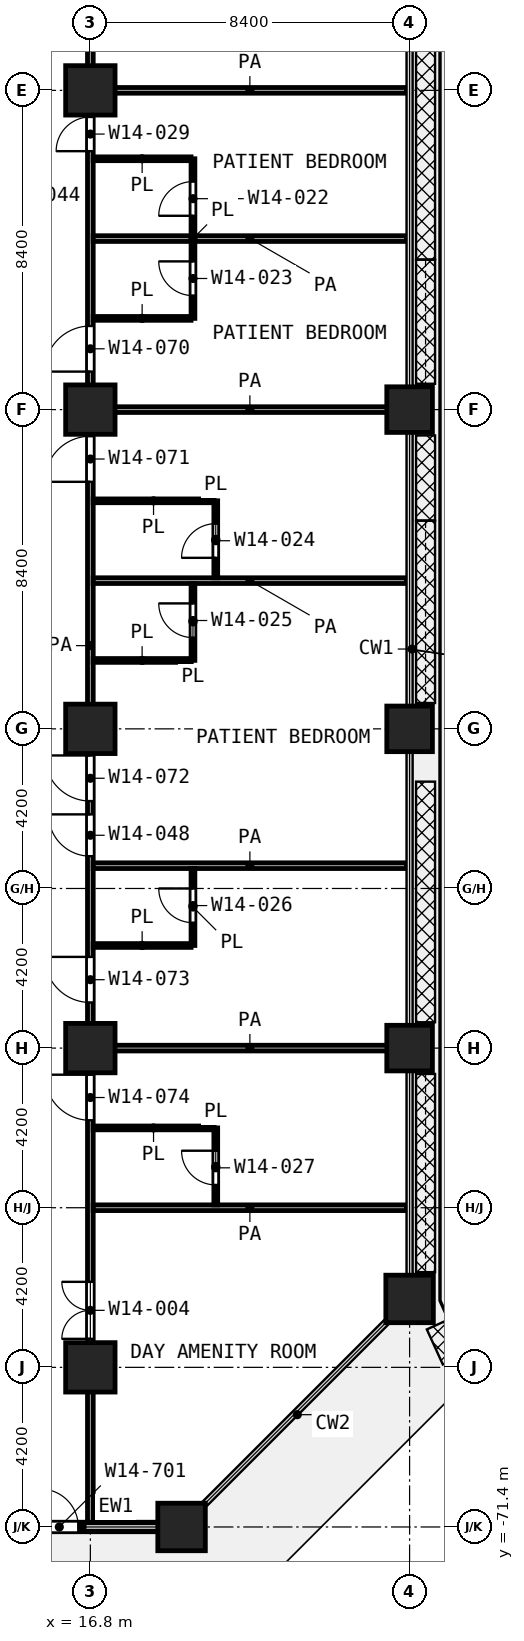
"""IFC4 building model, lengths in metres.
Left out: names, types, materials, properties, quantities, classifications, styles, units other than length and angle.
Written with IfcOpenShell. Run it as: python <this file> out.ifc"""

import sys

from ifc_helpers import new_model, si_unit, direction, frame, frame_2d, origin, origin_2d, place, context, subcontext, project, spatial, rectangle, extrude, element, fill, save


model = new_model("IFC4")
c1 = context("Model", 3, precision=1e-05, world=origin(), true_north=direction((0.0, 1.0)))
c2 = subcontext(c1, "Body", "Model", "MODEL_VIEW")
j1 = project(units=[si_unit("LENGTHUNIT", "METRE"), si_unit("PLANEANGLEUNIT", "RADIAN")], contexts=[c1])
p1 = place(None, origin())
s1 = spatial("IfcSite", under=j1, at=p1, CompositionType="ELEMENT")
p2 = place(p1, origin())
s2 = spatial("IfcBuilding", under=s1, at=p2, CompositionType="ELEMENT")
p3 = place(p2, frame((0.0, 0.0, 64.4)))
s3 = spatial("IfcBuildingStorey", under=s2, at=p3, CompositionType="ELEMENT", Elevation=64.4)
for number, where, z_axis, x_axis in (
    (1, (16.8, -33.6, 0.0), (0.0, 0.0, 1.0), (1.0, 0.0, 0.0)),
    (2, (16.8, -42.0, 0.0), (0.0, 0.0, 1.0), (1.0, 0.0, 0.0)),
):
    element("IfcColumn", number, at=place(p3, frame(where, z_axis=z_axis, x_axis=x_axis)), inside=s3, PredefinedType="COLUMN", context=c2, shape_type="SweptSolid", body=[
        extrude(rectangle(XDim=1.3, YDim=1.3, at=origin_2d()), origin(), (0.0, 0.0, 1.0), 4.2),
    ])
p4 = place(p3, frame((25.2, -42.0, 0.0), z_axis=(0.0, 0.0, 1.0), x_axis=(1.0, 0.0, 0.0)))
e3 = element("IfcColumn", 3, at=p4, inside=s3, PredefinedType="COLUMN", context=c2, shape_type="SweptSolid", body=[
    extrude(rectangle(XDim=1.2, YDim=1.2, at=origin_2d()), origin(), (0.0, 0.0, 1.0), 4.2),
])
p5 = place(p3, frame((16.8, -50.4, 0.0), z_axis=(0.0, 0.0, 1.0), x_axis=(1.0, 0.0, 0.0)))
e4 = element("IfcColumn", 4, at=p5, inside=s3, PredefinedType="COLUMN", context=c2, shape_type="SweptSolid", body=[
    extrude(rectangle(XDim=1.3, YDim=1.3, at=origin_2d()), origin(), (0.0, 0.0, 1.0), 4.2),
])
p6 = place(p3, frame((25.2, -50.4, 0.0), z_axis=(0.0, 0.0, 1.0), x_axis=(1.0, 0.0, 0.0)))
e5 = element("IfcColumn", 5, at=p6, inside=s3, PredefinedType="COLUMN", context=c2, shape_type="SweptSolid", body=[
    extrude(rectangle(XDim=1.2, YDim=1.2, at=origin_2d()), origin(), (0.0, 0.0, 1.0), 4.2),
])
p7 = place(p3, frame((16.8, -58.8, 0.0), z_axis=(0.0, 0.0, 1.0), x_axis=(1.0, 0.0, 0.0)))
e6 = element("IfcColumn", 6, at=p7, inside=s3, PredefinedType="COLUMN", context=c2, shape_type="SweptSolid", body=[
    extrude(rectangle(XDim=1.3, YDim=1.3, at=origin_2d()), origin(), (0.0, 0.0, 1.0), 4.2),
])
p8 = place(p3, frame((25.2, -58.8, 0.0), z_axis=(0.0, 0.0, 1.0), x_axis=(1.0, 0.0, 0.0)))
e7 = element("IfcColumn", 7, at=p8, inside=s3, PredefinedType="COLUMN", context=c2, shape_type="SweptSolid", body=[
    extrude(rectangle(XDim=1.2, YDim=1.2, at=origin_2d()), origin(), (0.0, 0.0, 1.0), 4.2),
])
p9 = place(p3, frame((25.2, -65.4, 0.0), z_axis=(0.0, 0.0, 1.0), x_axis=(1.0, 0.0, 0.0)))
e8 = element("IfcColumn", 8, at=p9, inside=s3, PredefinedType="COLUMN", context=c2, shape_type="SweptSolid", body=[
    extrude(rectangle(XDim=1.25, YDim=1.25, at=origin_2d()), origin(), (0.0, 0.0, 1.0), 4.2),
])
p10 = place(p3, frame((16.8, -67.2, 0.0), z_axis=(0.0, 0.0, 1.0), x_axis=(1.0, 0.0, 0.0)))
e9 = element("IfcColumn", 9, at=p10, inside=s3, PredefinedType="COLUMN", context=c2, shape_type="SweptSolid", body=[
    extrude(rectangle(XDim=1.3, YDim=1.3, at=origin_2d()), origin(), (0.0, 0.0, 1.0), 4.2),
])
p11 = place(p3, frame((19.2, -71.4, 0.0), z_axis=(0.0, 0.0, 1.0), x_axis=(1.0, 0.0, 0.0)))
e10 = element("IfcColumn", 10, at=p11, inside=s3, PredefinedType="COLUMN", context=c2, shape_type="SweptSolid", body=[
    extrude(rectangle(XDim=1.25, YDim=1.25, at=origin_2d()), origin(), (0.0, 0.0, 1.0), 4.2),
])
p12 = place(p3, frame((14.592, -71.4, 0.0), z_axis=(0.0, 0.0, 1.0), x_axis=(1.0, 0.0, 0.0)))
e11 = element("IfcWall", 11, at=p12, inside=s3, PredefinedType="SOLIDWALL", context=c2, shape_type="SweptSolid", body=[
    extrude(rectangle(XDim=3.983, YDim=0.25, at=frame_2d((1.992, 0.0))), origin(), (0.0, 0.0, 1.0), 3.78),
])
p13 = place(p12, frame((0.892, 0.0, 0.0)))
e12 = element("IfcOpeningElement", 12, at=p13, cuts=e11, PredefinedType="OPENING", context=c2, shape_type="SweptSolid", body=[
    extrude(rectangle(XDim=1.0, YDim=2.1, at=frame_2d((0.5, 1.05))), frame((0.0, 0.135, 0.0), z_axis=(0.0, -1.0, 0.0), x_axis=(1.0, 0.0, 0.0)), (0.0, 0.0, 1.0), 0.27),
])
p14 = place(p3, frame((16.875, -60.9, 0.0), z_axis=(0.0, 0.0, 1.0), x_axis=(1.0, 0.0, 0.0)))
e13 = element("IfcWall", 13, at=p14, inside=s3, PredefinedType="PARTITIONING", context=c2, shape_type="SweptSolid", body=[
    extrude(rectangle(XDim=3.175, YDim=0.1, at=frame_2d((1.587, 0.0))), origin(), (0.0, 0.0, 1.0), 3.9),
])
p15 = place(p3, frame((16.875, -56.1, 0.0), z_axis=(0.0, 0.0, 1.0), x_axis=(1.0, 0.0, 0.0)))
e14 = element("IfcWall", 14, at=p15, inside=s3, PredefinedType="PARTITIONING", context=c2, shape_type="SweptSolid", body=[
    extrude(rectangle(XDim=2.575, YDim=0.1, at=frame_2d((1.288, 0.0))), origin(), (0.0, 0.0, 1.0), 3.9),
])
p16 = place(p3, frame((16.875, -48.6, 0.0), z_axis=(0.0, 0.0, 1.0), x_axis=(1.0, 0.0, 0.0)))
e15 = element("IfcWall", 15, at=p16, inside=s3, PredefinedType="PARTITIONING", context=c2, shape_type="SweptSolid", body=[
    extrude(rectangle(XDim=2.574, YDim=0.1, at=frame_2d((1.287, 0.0))), origin(), (0.0, 0.0, 1.0), 3.9),
])
p17 = place(p3, frame((16.875, -44.4, 0.0), z_axis=(0.0, 0.0, 1.0), x_axis=(1.0, 0.0, 0.0)))
e16 = element("IfcWall", 16, at=p17, inside=s3, PredefinedType="PARTITIONING", context=c2, shape_type="SweptSolid", body=[
    extrude(rectangle(XDim=3.175, YDim=0.1, at=frame_2d((1.587, 0.0))), origin(), (0.0, 0.0, 1.0), 3.9),
])
for number, where, z_axis, x_axis in (
    (17, (16.875, -39.6, 0.0), (0.0, 0.0, 1.0), (1.0, 0.0, 0.0)),
    (18, (16.875, -35.4, 0.0), (0.0, 0.0, 1.0), (1.0, 0.0, 0.0)),
):
    element("IfcWall", number, at=place(p3, frame(where, z_axis=z_axis, x_axis=x_axis)), inside=s3, PredefinedType="PARTITIONING", context=c2, shape_type="SweptSolid", body=[
        extrude(rectangle(XDim=2.575, YDim=0.1, at=frame_2d((1.288, 0.0))), origin(), (0.0, 0.0, 1.0), 3.9),
    ])
p18 = place(p3, frame((19.5, -56.1, 0.0), z_axis=(0.0, 0.0, 1.0), x_axis=(0.0, 1.0, 0.0)))
e19 = element("IfcWall", 19, at=p18, inside=s3, PredefinedType="PARTITIONING", context=c2, shape_type="SweptSolid", body=[
    extrude(rectangle(XDim=2.025, YDim=0.1, at=frame_2d((1.013, 0.0))), origin(), (0.0, 0.0, 1.0), 3.9),
])
p19 = place(p18, frame((0.6, 0.0, 0.0)))
e20 = element("IfcOpeningElement", 20, at=p19, cuts=e19, PredefinedType="OPENING", context=c2, shape_type="SweptSolid", body=[
    extrude(rectangle(XDim=0.9, YDim=2.1, at=frame_2d((0.45, 1.05))), frame((0.0, 0.06, 0.0), z_axis=(0.0, -1.0, 0.0), x_axis=(1.0, 0.0, 0.0)), (0.0, 0.0, 1.0), 0.12),
])
p20 = place(p3, frame((19.5, -48.598, 0.0), z_axis=(0.0, 0.0, 1.0), x_axis=(0.0, 1.0, 0.0)))
e21 = element("IfcWall", 21, at=p20, inside=s3, PredefinedType="PARTITIONING", context=c2, shape_type="SweptSolid", body=[
    extrude(rectangle(XDim=2.023, YDim=0.1, at=frame_2d((1.011, 0.0))), origin(), (0.0, 0.0, 1.0), 3.9),
])
p21 = place(p20, frame((0.599, 0.0, 0.0)))
e22 = element("IfcOpeningElement", 22, at=p21, cuts=e21, PredefinedType="OPENING", context=c2, shape_type="SweptSolid", body=[
    extrude(rectangle(XDim=0.9, YDim=2.1, at=frame_2d((0.45, 1.05))), frame((0.0, 0.06, 0.0), z_axis=(0.0, -1.0, 0.0), x_axis=(1.0, 0.0, 0.0)), (0.0, 0.0, 1.0), 0.12),
])
p22 = place(p3, frame((19.5, -39.6, 0.0), z_axis=(0.0, 0.0, 1.0), x_axis=(0.0, 1.0, 0.0)))
e23 = element("IfcWall", 23, at=p22, inside=s3, PredefinedType="PARTITIONING", context=c2, shape_type="SweptSolid", body=[
    extrude(rectangle(XDim=4.2, YDim=0.1, at=frame_2d((2.1, 0.0))), origin(), (0.0, 0.0, 1.0), 3.9),
])
p23 = place(p22, frame((2.7, 0.0, 0.0)))
e24 = element("IfcOpeningElement", 24, at=p23, cuts=e23, PredefinedType="OPENING", context=c2, shape_type="SweptSolid", body=[
    extrude(rectangle(XDim=0.9, YDim=2.1, at=frame_2d((0.45, 1.05))), frame((0.0, 0.06, 0.0), z_axis=(0.0, -1.0, 0.0), x_axis=(1.0, 0.0, 0.0)), (0.0, 0.0, 1.0), 0.12),
])
p24 = place(p22, frame((0.6, 0.0, 0.0)))
e25 = element("IfcOpeningElement", 25, at=p24, cuts=e23, PredefinedType="OPENING", context=c2, shape_type="SweptSolid", body=[
    extrude(rectangle(XDim=0.9, YDim=2.1, at=frame_2d((0.45, 1.05))), frame((0.0, 0.06, 0.0), z_axis=(0.0, -1.0, 0.0), x_axis=(1.0, 0.0, 0.0)), (0.0, 0.0, 1.0), 0.12),
])
p25 = place(p3, frame((20.1, -62.925, 0.0), z_axis=(0.0, 0.0, 1.0), x_axis=(0.0, 1.0, 0.0)))
e26 = element("IfcWall", 26, at=p25, inside=s3, PredefinedType="PARTITIONING", context=c2, shape_type="SweptSolid", body=[
    extrude(rectangle(XDim=2.025, YDim=0.1, at=frame_2d((1.013, 0.0))), origin(), (0.0, 0.0, 1.0), 3.9),
])
p26 = place(p25, frame((0.525, 0.0, 0.0)))
e27 = element("IfcOpeningElement", 27, at=p26, cuts=e26, PredefinedType="OPENING", context=c2, shape_type="SweptSolid", body=[
    extrude(rectangle(XDim=0.9, YDim=2.1, at=frame_2d((0.45, 1.05))), frame((0.0, 0.06, 0.0), z_axis=(0.0, -1.0, 0.0), x_axis=(1.0, 0.0, 0.0)), (0.0, 0.0, 1.0), 0.12),
])
p27 = place(p3, frame((20.1, -46.425, 0.0), z_axis=(0.0, 0.0, 1.0), x_axis=(0.0, 1.0, 0.0)))
e28 = element("IfcWall", 28, at=p27, inside=s3, PredefinedType="PARTITIONING", context=c2, shape_type="SweptSolid", body=[
    extrude(rectangle(XDim=2.025, YDim=0.1, at=frame_2d((1.013, 0.0))), origin(), (0.0, 0.0, 1.0), 3.9),
])
p28 = place(p27, frame((0.525, 0.0, 0.0)))
e29 = element("IfcOpeningElement", 29, at=p28, cuts=e28, PredefinedType="OPENING", context=c2, shape_type="SweptSolid", body=[
    extrude(rectangle(XDim=0.9, YDim=2.1, at=frame_2d((0.45, 1.05))), frame((0.0, 0.06, 0.0), z_axis=(0.0, -1.0, 0.0), x_axis=(1.0, 0.0, 0.0)), (0.0, 0.0, 1.0), 0.12),
])
for number, where, z_axis, x_axis in (
    (30, (16.875, -63.0, 0.0), (0.0, 0.0, 1.0), (1.0, 0.0, 0.0)),
    (31, (16.875, -58.8, 0.0), (0.0, 0.0, 1.0), (1.0, 0.0, 0.0)),
    (32, (16.875, -54.0, 0.0), (0.0, 0.0, 1.0), (1.0, 0.0, 0.0)),
    (33, (16.875, -46.5, 0.0), (0.0, 0.0, 1.0), (1.0, 0.0, 0.0)),
    (34, (16.875, -42.0, 0.0), (0.0, 0.0, 1.0), (1.0, 0.0, 0.0)),
    (35, (16.875, -37.5, 0.0), (0.0, 0.0, 1.0), (1.0, 0.0, 0.0)),
    (36, (16.875, -33.6, 0.0), (0.0, 0.0, 1.0), (1.0, 0.0, 0.0)),
):
    element("IfcWall", number, at=place(p3, frame(where, z_axis=z_axis, x_axis=x_axis)), inside=s3, PredefinedType="PARTITIONING", context=c2, shape_type="SweptSolid", body=[
        extrude(rectangle(XDim=8.245, YDim=0.15, at=frame_2d((4.123, 0.0))), origin(), (0.0, 0.0, 1.0), 3.9),
    ])
p29 = place(p3, frame((16.8, -71.32, 0.0), z_axis=(0.0, 0.0, 1.0), x_axis=(0.0, 1.0, 0.0)))
e37 = element("IfcWall", 37, at=p29, inside=s3, PredefinedType="PARTITIONING", context=c2, shape_type="SweptSolid", body=[
    extrude(rectangle(XDim=46.22, YDim=0.15, at=frame_2d((23.11, 0.0))), origin(), (0.0, 0.0, 1.0), 3.9),
])
p30 = place(p29, frame((39.32, 0.0, 0.0)))
e38 = element("IfcOpeningElement", 38, at=p30, cuts=e37, PredefinedType="OPENING", context=c2, shape_type="SweptSolid", body=[
    extrude(rectangle(XDim=1.0, YDim=2.1, at=frame_2d((0.5, 1.05))), frame((0.0, 0.085, 0.0), z_axis=(0.0, -1.0, 0.0), x_axis=(1.0, 0.0, 0.0)), (0.0, 0.0, 1.0), 0.17),
])
p31 = place(p29, frame((36.12, 0.0, 0.0)))
e39 = element("IfcOpeningElement", 39, at=p31, cuts=e37, PredefinedType="OPENING", context=c2, shape_type="SweptSolid", body=[
    extrude(rectangle(XDim=0.9, YDim=2.1, at=frame_2d((0.45, 1.05))), frame((0.0, 0.085, 0.0), z_axis=(0.0, -1.0, 0.0), x_axis=(1.0, 0.0, 0.0)), (0.0, 0.0, 1.0), 0.17),
])
p32 = place(p29, frame((30.32, 0.0, 0.0)))
e40 = element("IfcOpeningElement", 40, at=p32, cuts=e37, PredefinedType="OPENING", context=c2, shape_type="SweptSolid", body=[
    extrude(rectangle(XDim=1.2, YDim=2.1, at=frame_2d((0.6, 1.05))), frame((0.0, 0.085, 0.0), z_axis=(0.0, -1.0, 0.0), x_axis=(1.0, 0.0, 0.0)), (0.0, 0.0, 1.0), 0.17),
])
p33 = place(p29, frame((27.42, 0.0, 0.0)))
e41 = element("IfcOpeningElement", 41, at=p33, cuts=e37, PredefinedType="OPENING", context=c2, shape_type="SweptSolid", body=[
    extrude(rectangle(XDim=1.2, YDim=2.1, at=frame_2d((0.6, 1.05))), frame((0.0, 0.085, 0.0), z_axis=(0.0, -1.0, 0.0), x_axis=(1.0, 0.0, 0.0)), (0.0, 0.0, 1.0), 0.17),
])
p34 = place(p29, frame((19.02, 0.0, 0.0)))
e42 = element("IfcOpeningElement", 42, at=p34, cuts=e37, PredefinedType="OPENING", context=c2, shape_type="SweptSolid", body=[
    extrude(rectangle(XDim=1.2, YDim=2.1, at=frame_2d((0.6, 1.05))), frame((0.0, 0.085, 0.0), z_axis=(0.0, -1.0, 0.0), x_axis=(1.0, 0.0, 0.0)), (0.0, 0.0, 1.0), 0.17),
])
p35 = place(p29, frame((17.57, 0.0, 0.0)))
e43 = element("IfcOpeningElement", 43, at=p35, cuts=e37, PredefinedType="OPENING", context=c2, shape_type="SweptSolid", body=[
    extrude(rectangle(XDim=1.1, YDim=2.1, at=frame_2d((0.55, 1.05))), frame((0.0, 0.085, 0.0), z_axis=(0.0, -1.0, 0.0), x_axis=(1.0, 0.0, 0.0)), (0.0, 0.0, 1.0), 0.17),
])
p36 = place(p29, frame((13.72, 0.0, 0.0)))
e44 = element("IfcOpeningElement", 44, at=p36, cuts=e37, PredefinedType="OPENING", context=c2, shape_type="SweptSolid", body=[
    extrude(rectangle(XDim=1.2, YDim=2.1, at=frame_2d((0.6, 1.05))), frame((0.0, 0.085, 0.0), z_axis=(0.0, -1.0, 0.0), x_axis=(1.0, 0.0, 0.0)), (0.0, 0.0, 1.0), 0.17),
])
p37 = place(p29, frame((10.62, 0.0, 0.0)))
e45 = element("IfcOpeningElement", 45, at=p37, cuts=e37, PredefinedType="OPENING", context=c2, shape_type="SweptSolid", body=[
    extrude(rectangle(XDim=1.2, YDim=2.1, at=frame_2d((0.6, 1.05))), frame((0.0, 0.085, 0.0), z_axis=(0.0, -1.0, 0.0), x_axis=(1.0, 0.0, 0.0)), (0.0, 0.0, 1.0), 0.17),
])
p38 = place(p29, frame((4.87, 0.0, 0.0)))
e46 = element("IfcOpeningElement", 46, at=p38, cuts=e37, PredefinedType="OPENING", context=c2, shape_type="SweptSolid", body=[
    extrude(rectangle(XDim=1.5, YDim=2.1, at=frame_2d((0.75, 1.05))), frame((0.0, 0.085, 0.0), z_axis=(0.0, -1.0, 0.0), x_axis=(1.0, 0.0, 0.0)), (0.0, 0.0, 1.0), 0.17),
])
p39 = place(p13, origin())
e47 = element("IfcDoor", 47, at=p39, inside=s3, OperationType="SINGLE_SWING_LEFT", PredefinedType="DOOR", context=c2, shape_type="SweptSolid", body=[
    extrude(rectangle(XDim=1.0, YDim=2.1, at=frame_2d((0.5, 1.05))), frame((0.0, 0.025, 0.0), z_axis=(0.0, -1.0, 0.0), x_axis=(1.0, 0.0, 0.0)), (0.0, 0.0, 1.0), 0.05),
])
fill(e12, e47)
p40 = place(p31, origin())
e48 = element("IfcDoor", 48, at=p40, inside=s3, OperationType="SINGLE_SWING_LEFT", PredefinedType="DOOR", context=c2, shape_type="SweptSolid", body=[
    extrude(rectangle(XDim=0.9, YDim=2.1, at=frame_2d((0.45, 1.05))), frame((0.0, 0.025, 0.0), z_axis=(0.0, -1.0, 0.0), x_axis=(1.0, 0.0, 0.0)), (0.0, 0.0, 1.0), 0.05),
])
fill(e39, e48)
p41 = place(p23, origin())
e49 = element("IfcDoor", 49, at=p41, inside=s3, OperationType="SINGLE_SWING_LEFT", PredefinedType="DOOR", context=c2, shape_type="SweptSolid", body=[
    extrude(rectangle(XDim=0.9, YDim=2.1, at=frame_2d((0.45, 1.05))), frame((0.0, 0.025, 0.0), z_axis=(0.0, -1.0, 0.0), x_axis=(1.0, 0.0, 0.0)), (0.0, 0.0, 1.0), 0.05),
])
fill(e24, e49)
p42 = place(p32, origin())
e50 = element("IfcDoor", 50, at=p42, inside=s3, OperationType="SINGLE_SWING_LEFT", PredefinedType="DOOR", context=c2, shape_type="SweptSolid", body=[
    extrude(rectangle(XDim=1.2, YDim=2.1, at=frame_2d((0.6, 1.05))), frame((0.0, 0.025, 0.0), z_axis=(0.0, -1.0, 0.0), x_axis=(1.0, 0.0, 0.0)), (0.0, 0.0, 1.0), 0.05),
])
fill(e40, e50)
p43 = place(p24, origin())
e51 = element("IfcDoor", 51, at=p43, inside=s3, OperationType="SINGLE_SWING_RIGHT", PredefinedType="DOOR", context=c2, shape_type="SweptSolid", body=[
    extrude(rectangle(XDim=0.9, YDim=2.1, at=frame_2d((0.45, 1.05))), frame((0.0, 0.025, 0.0), z_axis=(0.0, -1.0, 0.0), x_axis=(1.0, 0.0, 0.0)), (0.0, 0.0, 1.0), 0.05),
])
fill(e25, e51)
p44 = place(p33, origin())
e52 = element("IfcDoor", 52, at=p44, inside=s3, OperationType="SINGLE_SWING_LEFT", PredefinedType="DOOR", context=c2, shape_type="SweptSolid", body=[
    extrude(rectangle(XDim=1.2, YDim=2.1, at=frame_2d((0.6, 1.05))), frame((0.0, 0.025, 0.0), z_axis=(0.0, -1.0, 0.0), x_axis=(1.0, 0.0, 0.0)), (0.0, 0.0, 1.0), 0.05),
])
fill(e41, e52)
p45 = place(p28, origin())
e53 = element("IfcDoor", 53, at=p45, inside=s3, OperationType="SINGLE_SWING_LEFT", PredefinedType="DOOR", context=c2, shape_type="SweptSolid", body=[
    extrude(rectangle(XDim=0.9, YDim=2.1, at=frame_2d((0.45, 1.05))), frame((0.0, 0.025, 0.0), z_axis=(0.0, -1.0, 0.0), x_axis=(1.0, 0.0, 0.0)), (0.0, 0.0, 1.0), 0.05),
])
fill(e29, e53)
p46 = place(p34, origin())
e54 = element("IfcDoor", 54, at=p46, inside=s3, OperationType="SINGLE_SWING_RIGHT", PredefinedType="DOOR", context=c2, shape_type="SweptSolid", body=[
    extrude(rectangle(XDim=1.2, YDim=2.1, at=frame_2d((0.6, 1.05))), frame((0.0, 0.025, 0.0), z_axis=(0.0, -1.0, 0.0), x_axis=(1.0, 0.0, 0.0)), (0.0, 0.0, 1.0), 0.05),
])
fill(e42, e54)
p47 = place(p35, origin())
e55 = element("IfcDoor", 55, at=p47, inside=s3, OperationType="SINGLE_SWING_RIGHT", PredefinedType="DOOR", context=c2, shape_type="SweptSolid", body=[
    extrude(rectangle(XDim=1.1, YDim=2.1, at=frame_2d((0.55, 1.05))), frame((0.0, 0.025, 0.0), z_axis=(0.0, -1.0, 0.0), x_axis=(1.0, 0.0, 0.0)), (0.0, 0.0, 1.0), 0.05),
])
fill(e43, e55)
p48 = place(p21, origin())
e56 = element("IfcDoor", 56, at=p48, inside=s3, OperationType="SINGLE_SWING_RIGHT", PredefinedType="DOOR", context=c2, shape_type="SweptSolid", body=[
    extrude(rectangle(XDim=0.9, YDim=2.1, at=frame_2d((0.45, 1.05))), frame((0.0, 0.025, 0.0), z_axis=(0.0, -1.0, 0.0), x_axis=(1.0, 0.0, 0.0)), (0.0, 0.0, 1.0), 0.05),
])
fill(e22, e56)
p49 = place(p36, origin())
e57 = element("IfcDoor", 57, at=p49, inside=s3, OperationType="SINGLE_SWING_RIGHT", PredefinedType="DOOR", context=c2, shape_type="SweptSolid", body=[
    extrude(rectangle(XDim=1.2, YDim=2.1, at=frame_2d((0.6, 1.05))), frame((0.0, 0.025, 0.0), z_axis=(0.0, -1.0, 0.0), x_axis=(1.0, 0.0, 0.0)), (0.0, 0.0, 1.0), 0.05),
])
fill(e44, e57)
p50 = place(p19, origin())
e58 = element("IfcDoor", 58, at=p50, inside=s3, OperationType="SINGLE_SWING_RIGHT", PredefinedType="DOOR", context=c2, shape_type="SweptSolid", body=[
    extrude(rectangle(XDim=0.9, YDim=2.1, at=frame_2d((0.45, 1.05))), frame((0.0, 0.025, 0.0), z_axis=(0.0, -1.0, 0.0), x_axis=(1.0, 0.0, 0.0)), (0.0, 0.0, 1.0), 0.05),
])
fill(e20, e58)
p51 = place(p37, origin())
e59 = element("IfcDoor", 59, at=p51, inside=s3, OperationType="SINGLE_SWING_RIGHT", PredefinedType="DOOR", context=c2, shape_type="SweptSolid", body=[
    extrude(rectangle(XDim=1.2, YDim=2.1, at=frame_2d((0.6, 1.05))), frame((0.0, 0.025, 0.0), z_axis=(0.0, -1.0, 0.0), x_axis=(1.0, 0.0, 0.0)), (0.0, 0.0, 1.0), 0.05),
])
fill(e45, e59)
p52 = place(p26, origin())
e60 = element("IfcDoor", 60, at=p52, inside=s3, OperationType="SINGLE_SWING_RIGHT", PredefinedType="DOOR", context=c2, shape_type="SweptSolid", body=[
    extrude(rectangle(XDim=0.9, YDim=2.1, at=frame_2d((0.45, 1.05))), frame((0.0, 0.025, 0.0), z_axis=(0.0, -1.0, 0.0), x_axis=(1.0, 0.0, 0.0)), (0.0, 0.0, 1.0), 0.05),
])
fill(e27, e60)
p53 = place(p38, origin())
e61 = element("IfcDoor", 61, at=p53, inside=s3, OperationType="DOUBLE_DOOR_SINGLE_SWING", PredefinedType="DOOR", context=c2, shape_type="SweptSolid", body=[
    extrude(rectangle(XDim=1.5, YDim=2.1, at=frame_2d((0.75, 1.05))), frame((0.0, 0.025, 0.0), z_axis=(0.0, -1.0, 0.0), x_axis=(1.0, 0.0, 0.0)), (0.0, 0.0, 1.0), 0.05),
])
fill(e46, e61)
save(model, sys.argv[1])
